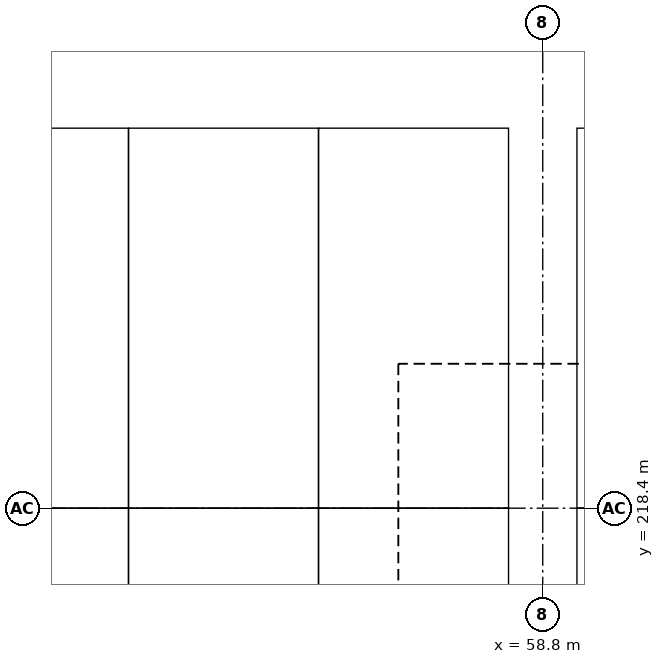
"""IFC4 building model, lengths in metres.
Left out: names, types, materials, properties, quantities, classifications, styles, units other than length and angle.
Written with IfcOpenShell. Run it as: python <this file> out.ifc"""

import sys

from ifc_helpers import new_model, si_unit, direction, frame, origin, origin_2d, place, context, subcontext, project, spatial, rectangle, extrude, element, save


model = new_model("IFC4")
c1 = context("Model", 3, precision=1e-05, world=origin(), true_north=direction((0.0, 1.0)))
c2 = subcontext(c1, "Body", "Model", "MODEL_VIEW")
j1 = project(units=[si_unit("LENGTHUNIT", "METRE"), si_unit("PLANEANGLEUNIT", "RADIAN")], contexts=[c1])
p1 = place(None, origin())
s1 = spatial("IfcSite", under=j1, at=p1, CompositionType="ELEMENT")
p2 = place(p1, origin())
s2 = spatial("IfcBuilding", under=s1, at=p2, CompositionType="ELEMENT")
p3 = place(p2, frame((0.0, 0.0, -3.0)))
s3 = spatial("IfcBuildingStorey", under=s2, at=p3, CompositionType="ELEMENT", Elevation=-3.0)
p4 = place(p3, frame((58.8, 218.4, 0.0), z_axis=(0.0, 0.0, 1.0), x_axis=(1.0, 0.0, 0.0)))
e1 = element("IfcColumn", 1, at=p4, inside=s3, PredefinedType="COLUMN", context=c2, shape_type="SweptSolid", body=[
    extrude(rectangle(XDim=0.8, YDim=0.8, at=origin_2d()), origin(), (0.0, 0.0, 1.0), 2.4),
])
save(model, sys.argv[1])
